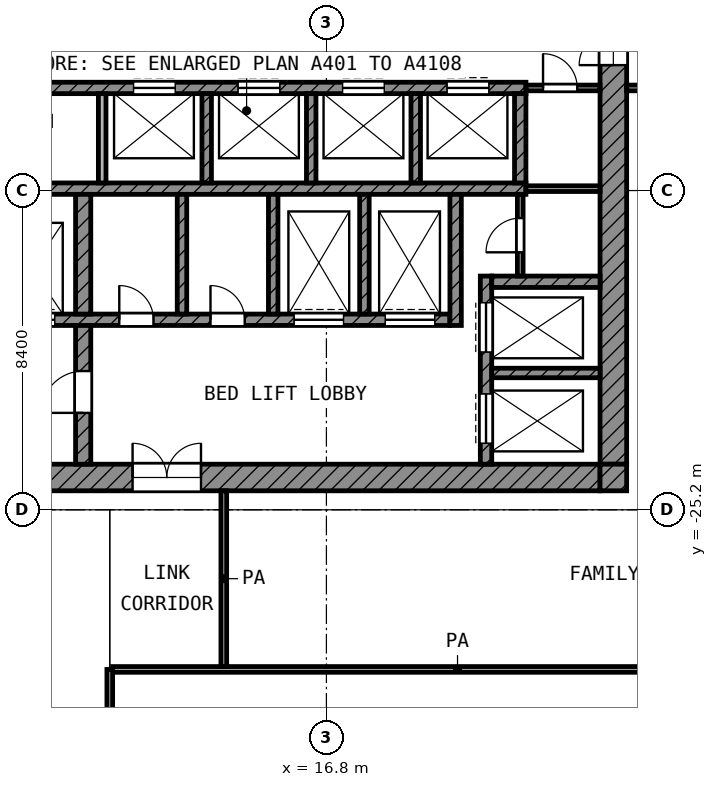
"""IFC4 building model, lengths in metres.
Left out: names, types, materials, properties, quantities, classifications, styles, units other than length and angle.
Written with IfcOpenShell. Run it as: python <this file> out.ifc"""

import sys

from ifc_helpers import new_model, si_unit, direction, frame, frame_2d, origin, place, context, subcontext, project, spatial, rectangle, extrude, element, fill, save


model = new_model("IFC4")
c1 = context("Model", 3, precision=1e-05, world=origin(), true_north=direction((0.0, 1.0)))
c2 = subcontext(c1, "Body", "Model", "MODEL_VIEW")
j1 = project(units=[si_unit("LENGTHUNIT", "METRE"), si_unit("PLANEANGLEUNIT", "RADIAN")], contexts=[c1])
p1 = place(None, origin())
s1 = spatial("IfcSite", under=j1, at=p1, CompositionType="ELEMENT")
p2 = place(p1, origin())
s2 = spatial("IfcBuilding", under=s1, at=p2, CompositionType="ELEMENT")
p3 = place(p2, frame((0.0, 0.0, 323.8)))
s3 = spatial("IfcBuildingStorey", under=s2, at=p3, CompositionType="ELEMENT", Elevation=323.8)
p4 = place(p3, frame((24.35, -24.0, 0.0), z_axis=(0.0, 0.0, 1.0), x_axis=(0.0, 1.0, 0.0)))
e1 = element("IfcWall", 1, at=p4, inside=s3, PredefinedType="SHEAR", context=c2, shape_type="SweptSolid", body=[
    extrude(rectangle(XDim=18.6, YDim=0.7, at=frame_2d((9.3, 0.0))), origin(), (0.0, 0.0, 1.0), 3.6),
])
p5 = place(p4, frame((10.5, 0.0, 0.0)))
e2 = element("IfcOpeningElement", 2, at=p5, cuts=e1, PredefinedType="OPENING", context=c2, shape_type="SweptSolid", body=[
    extrude(rectangle(XDim=1.8, YDim=2.1, at=frame_2d((0.9, 1.05))), frame((0.0, 0.36, 0.0), z_axis=(0.0, -1.0, 0.0), x_axis=(1.0, 0.0, 0.0)), (0.0, 0.0, 1.0), 0.72),
])
p6 = place(p3, frame((5.4, -24.35, 0.0), z_axis=(0.0, 0.0, 1.0), x_axis=(1.0, 0.0, 0.0)))
e3 = element("IfcWall", 3, at=p6, inside=s3, PredefinedType="SHEAR", context=c2, shape_type="SweptSolid", body=[
    extrude(rectangle(XDim=18.6, YDim=0.7, at=frame_2d((9.3, 0.0))), origin(), (0.0, 0.0, 1.0), 3.6),
])
p7 = place(p6, frame((6.3, 0.0, 0.0)))
e4 = element("IfcOpeningElement", 4, at=p7, cuts=e3, PredefinedType="OPENING", context=c2, shape_type="SweptSolid", body=[
    extrude(rectangle(XDim=1.8, YDim=2.1, at=frame_2d((0.9, 1.05))), frame((0.0, 0.36, 0.0), z_axis=(0.0, -1.0, 0.0), x_axis=(1.0, 0.0, 0.0)), (0.0, 0.0, 1.0), 0.72),
])
p8 = place(p3, frame((24.35, -24.7, 0.0), z_axis=(0.0, 0.0, 1.0), x_axis=(0.0, 1.0, 0.0)))
e5 = element("IfcWall", 5, at=p8, inside=s3, PredefinedType="SHEAR", context=c2, shape_type="SweptSolid", body=[
    extrude(rectangle(XDim=0.7, YDim=0.7, at=frame_2d((0.35, 0.0))), origin(), (0.0, 0.0, 1.0), 3.6),
])
p9 = place(p3, frame((5.4, -14.1, 0.0), z_axis=(0.0, 0.0, 1.0), x_axis=(1.0, 0.0, 0.0)))
e6 = element("IfcWall", 6, at=p9, inside=s3, PredefinedType="SHEAR", context=c2, shape_type="SweptSolid", body=[
    extrude(rectangle(XDim=16.65, YDim=0.3, at=frame_2d((8.325, 0.0))), origin(), (0.0, 0.0, 1.0), 3.6),
])
p10 = place(p9, frame((6.325, 0.0, 0.0)))
e7 = element("IfcOpeningElement", 7, at=p10, cuts=e6, PredefinedType="OPENING", context=c2, shape_type="SweptSolid", body=[
    extrude(rectangle(XDim=1.1, YDim=2.1, at=frame_2d((0.55, 1.05))), frame((0.0, 0.16, 0.0), z_axis=(0.0, -1.0, 0.0), x_axis=(1.0, 0.0, 0.0)), (0.0, 0.0, 1.0), 0.32),
])
p11 = place(p9, frame((9.075, 0.0, 0.0)))
e8 = element("IfcOpeningElement", 8, at=p11, cuts=e6, PredefinedType="OPENING", context=c2, shape_type="SweptSolid", body=[
    extrude(rectangle(XDim=1.1, YDim=2.1, at=frame_2d((0.55, 1.05))), frame((0.0, 0.16, 0.0), z_axis=(0.0, -1.0, 0.0), x_axis=(1.0, 0.0, 0.0)), (0.0, 0.0, 1.0), 0.32),
])
p12 = place(p9, frame((11.825, 0.0, 0.0)))
e9 = element("IfcOpeningElement", 9, at=p12, cuts=e6, PredefinedType="OPENING", context=c2, shape_type="SweptSolid", body=[
    extrude(rectangle(XDim=1.1, YDim=2.1, at=frame_2d((0.55, 1.05))), frame((0.0, 0.16, 0.0), z_axis=(0.0, -1.0, 0.0), x_axis=(1.0, 0.0, 0.0)), (0.0, 0.0, 1.0), 0.32),
])
p13 = place(p9, frame((14.575, 0.0, 0.0)))
e10 = element("IfcOpeningElement", 10, at=p13, cuts=e6, PredefinedType="OPENING", context=c2, shape_type="SweptSolid", body=[
    extrude(rectangle(XDim=1.1, YDim=2.1, at=frame_2d((0.55, 1.05))), frame((0.0, 0.16, 0.0), z_axis=(0.0, -1.0, 0.0), x_axis=(1.0, 0.0, 0.0)), (0.0, 0.0, 1.0), 0.32),
])
p14 = place(p9, frame((2.3, 0.0, 0.0)))
e11 = element("IfcOpeningElement", 11, at=p14, cuts=e6, PredefinedType="OPENING", context=c2, shape_type="SweptSolid", body=[
    extrude(rectangle(XDim=0.9, YDim=2.1, at=frame_2d((0.45, 1.05))), frame((0.0, 0.16, 0.0), z_axis=(0.0, -1.0, 0.0), x_axis=(1.0, 0.0, 0.0)), (0.0, 0.0, 1.0), 0.32),
])
p15 = place(p3, frame((5.4, -16.75, 0.0), z_axis=(0.0, 0.0, 1.0), x_axis=(1.0, 0.0, 0.0)))
e12 = element("IfcWall", 12, at=p15, inside=s3, PredefinedType="SHEAR", context=c2, shape_type="SweptSolid", body=[
    extrude(rectangle(XDim=16.65, YDim=0.3, at=frame_2d((8.325, 0.0))), origin(), (0.0, 0.0, 1.0), 3.6),
])
p16 = place(p3, frame((5.4, -20.2, 0.0), z_axis=(0.0, 0.0, 1.0), x_axis=(1.0, 0.0, 0.0)))
e13 = element("IfcWall", 13, at=p16, inside=s3, PredefinedType="SHEAR", context=c2, shape_type="SweptSolid", body=[
    extrude(rectangle(XDim=14.65, YDim=0.3, at=frame_2d((7.325, 0.0))), origin(), (0.0, 0.0, 1.0), 3.6),
])
p17 = place(p16, frame((10.55, 0.0, 0.0)))
e14 = element("IfcOpeningElement", 14, at=p17, cuts=e13, PredefinedType="OPENING", context=c2, shape_type="SweptSolid", body=[
    extrude(rectangle(XDim=1.3, YDim=2.1, at=frame_2d((0.65, 1.05))), frame((0.0, 0.16, 0.0), z_axis=(0.0, -1.0, 0.0), x_axis=(1.0, 0.0, 0.0)), (0.0, 0.0, 1.0), 0.32),
])
p18 = place(p16, frame((12.95, 0.0, 0.0)))
e15 = element("IfcOpeningElement", 15, at=p18, cuts=e13, PredefinedType="OPENING", context=c2, shape_type="SweptSolid", body=[
    extrude(rectangle(XDim=1.3, YDim=2.1, at=frame_2d((0.65, 1.05))), frame((0.0, 0.16, 0.0), z_axis=(0.0, -1.0, 0.0), x_axis=(1.0, 0.0, 0.0)), (0.0, 0.0, 1.0), 0.32),
])
p19 = place(p16, frame((0.55, 0.0, 0.0)))
e16 = element("IfcOpeningElement", 16, at=p19, cuts=e13, PredefinedType="OPENING", context=c2, shape_type="SweptSolid", body=[
    extrude(rectangle(XDim=1.3, YDim=2.1, at=frame_2d((0.65, 1.05))), frame((0.0, 0.16, 0.0), z_axis=(0.0, -1.0, 0.0), x_axis=(1.0, 0.0, 0.0)), (0.0, 0.0, 1.0), 0.32),
])
p20 = place(p16, frame((2.95, 0.0, 0.0)))
e17 = element("IfcOpeningElement", 17, at=p20, cuts=e13, PredefinedType="OPENING", context=c2, shape_type="SweptSolid", body=[
    extrude(rectangle(XDim=1.3, YDim=2.1, at=frame_2d((0.65, 1.05))), frame((0.0, 0.16, 0.0), z_axis=(0.0, -1.0, 0.0), x_axis=(1.0, 0.0, 0.0)), (0.0, 0.0, 1.0), 0.32),
])
p21 = place(p16, frame((5.95, 0.0, 0.0)))
e18 = element("IfcOpeningElement", 18, at=p21, cuts=e13, PredefinedType="OPENING", context=c2, shape_type="SweptSolid", body=[
    extrude(rectangle(XDim=0.9, YDim=2.1, at=frame_2d((0.45, 1.05))), frame((0.0, 0.16, 0.0), z_axis=(0.0, -1.0, 0.0), x_axis=(1.0, 0.0, 0.0)), (0.0, 0.0, 1.0), 0.32),
])
p22 = place(p16, frame((8.35, 0.0, 0.0)))
e19 = element("IfcOpeningElement", 19, at=p22, cuts=e13, PredefinedType="OPENING", context=c2, shape_type="SweptSolid", body=[
    extrude(rectangle(XDim=0.9, YDim=2.1, at=frame_2d((0.45, 1.05))), frame((0.0, 0.16, 0.0), z_axis=(0.0, -1.0, 0.0), x_axis=(1.0, 0.0, 0.0)), (0.0, 0.0, 1.0), 0.32),
])
p23 = place(p3, frame((10.4, -24.0, 0.0), z_axis=(0.0, 0.0, 1.0), x_axis=(0.0, 1.0, 0.0)))
e20 = element("IfcWall", 20, at=p23, inside=s3, PredefinedType="SHEAR", context=c2, shape_type="SweptSolid", body=[
    extrude(rectangle(XDim=3.65, YDim=0.4, at=frame_2d((1.825, 0.0))), origin(), (0.0, 0.0, 1.0), 3.6),
])
p24 = place(p23, frame((1.35, 0.0, 0.0)))
e21 = element("IfcOpeningElement", 21, at=p24, cuts=e20, PredefinedType="OPENING", context=c2, shape_type="SweptSolid", body=[
    extrude(rectangle(XDim=1.1, YDim=2.1, at=frame_2d((0.55, 1.05))), frame((0.0, 0.21, 0.0), z_axis=(0.0, -1.0, 0.0), x_axis=(1.0, 0.0, 0.0)), (0.0, 0.0, 1.0), 0.42),
])
p25 = place(p3, frame((10.4, -20.05, 0.0), z_axis=(0.0, 0.0, 1.0), x_axis=(0.0, 1.0, 0.0)))
e22 = element("IfcWall", 22, at=p25, inside=s3, PredefinedType="SHEAR", context=c2, shape_type="SweptSolid", body=[
    extrude(rectangle(XDim=3.15, YDim=0.4, at=frame_2d((1.575, 0.0))), origin(), (0.0, 0.0, 1.0), 3.6),
])
p26 = place(p3, frame((20.2, -20.35, 0.0), z_axis=(0.0, 0.0, 1.0), x_axis=(0.0, 1.0, 0.0)))
e23 = element("IfcWall", 23, at=p26, inside=s3, PredefinedType="SHEAR", context=c2, shape_type="SweptSolid", body=[
    extrude(rectangle(XDim=3.45, YDim=0.3, at=frame_2d((1.725, 0.0))), origin(), (0.0, 0.0, 1.0), 3.6),
])
p27 = place(p3, frame((21.9, -16.6, 0.0), z_axis=(0.0, 0.0, 1.0), x_axis=(0.0, 1.0, 0.0)))
e24 = element("IfcWall", 24, at=p27, inside=s3, PredefinedType="SHEAR", context=c2, shape_type="SweptSolid", body=[
    extrude(rectangle(XDim=2.35, YDim=0.3, at=frame_2d((1.175, 0.0))), origin(), (0.0, 0.0, 1.0), 3.6),
])
p28 = place(p3, frame((21.15, -19.2, 0.0), z_axis=(0.0, 0.0, 1.0), x_axis=(1.0, 0.0, 0.0)))
e25 = element("IfcWall", 25, at=p28, inside=s3, PredefinedType="SHEAR", context=c2, shape_type="SweptSolid", body=[
    extrude(rectangle(XDim=2.85, YDim=0.3, at=frame_2d((1.425, 0.0))), origin(), (0.0, 0.0, 1.0), 3.6),
])
p29 = place(p3, frame((21.0, -24.0, 0.0), z_axis=(0.0, 0.0, 1.0), x_axis=(0.0, 1.0, 0.0)))
e26 = element("IfcWall", 26, at=p29, inside=s3, PredefinedType="SHEAR", context=c2, shape_type="SweptSolid", body=[
    extrude(rectangle(XDim=4.95, YDim=0.3, at=frame_2d((2.475, 0.0))), origin(), (0.0, 0.0, 1.0), 3.6),
])
p30 = place(p29, frame((2.95, 0.0, 0.0)))
e27 = element("IfcOpeningElement", 27, at=p30, cuts=e26, PredefinedType="OPENING", context=c2, shape_type="SweptSolid", body=[
    extrude(rectangle(XDim=1.3, YDim=2.1, at=frame_2d((0.65, 1.05))), frame((0.0, 0.16, 0.0), z_axis=(0.0, -1.0, 0.0), x_axis=(1.0, 0.0, 0.0)), (0.0, 0.0, 1.0), 0.32),
])
p31 = place(p29, frame((0.55, 0.0, 0.0)))
e28 = element("IfcOpeningElement", 28, at=p31, cuts=e26, PredefinedType="OPENING", context=c2, shape_type="SweptSolid", body=[
    extrude(rectangle(XDim=1.3, YDim=2.1, at=frame_2d((0.65, 1.05))), frame((0.0, 0.16, 0.0), z_axis=(0.0, -1.0, 0.0), x_axis=(1.0, 0.0, 0.0)), (0.0, 0.0, 1.0), 0.32),
])
p32 = place(p3, frame((21.15, -21.6, 0.0), z_axis=(0.0, 0.0, 1.0), x_axis=(1.0, 0.0, 0.0)))
e29 = element("IfcWall", 29, at=p32, inside=s3, PredefinedType="SHEAR", context=c2, shape_type="SweptSolid", body=[
    extrude(rectangle(XDim=2.85, YDim=0.25, at=frame_2d((1.425, 0.0))), origin(), (0.0, 0.0, 1.0), 3.6),
])
for number, where, z_axis, x_axis in (
    (30, (13.0, -20.05, 0.0), (0.0, 0.0, 1.0), (0.0, 1.0, 0.0)),
    (31, (15.4, -20.05, 0.0), (0.0, 0.0, 1.0), (0.0, 1.0, 0.0)),
    (32, (17.8, -20.05, 0.0), (0.0, 0.0, 1.0), (0.0, 1.0, 0.0)),
):
    element("IfcWall", number, at=place(p3, frame(where, z_axis=z_axis, x_axis=x_axis)), inside=s3, PredefinedType="SHEAR", context=c2, shape_type="SweptSolid", body=[
        extrude(rectangle(XDim=3.15, YDim=0.25, at=frame_2d((1.575, 0.0))), origin(), (0.0, 0.0, 1.0), 3.6),
    ])
p33 = place(p3, frame((10.9, -16.6, 0.0), z_axis=(0.0, 0.0, 1.0), x_axis=(0.0, 1.0, 0.0)))
e33 = element("IfcWall", 33, at=p33, inside=s3, PredefinedType="PARTITIONING", context=c2, shape_type="SweptSolid", body=[
    extrude(rectangle(XDim=2.35, YDim=0.2, at=frame_2d((1.175, 0.0))), origin(), (0.0, 0.0, 1.0), 3.6),
])
for number, where, z_axis, x_axis in (
    (34, (13.65, -16.6, 0.0), (0.0, 0.0, 1.0), (0.0, 1.0, 0.0)),
    (35, (16.4, -16.6, 0.0), (0.0, 0.0, 1.0), (0.0, 1.0, 0.0)),
    (36, (19.15, -16.6, 0.0), (0.0, 0.0, 1.0), (0.0, 1.0, 0.0)),
):
    element("IfcWall", number, at=place(p3, frame(where, z_axis=z_axis, x_axis=x_axis)), inside=s3, PredefinedType="SHEAR", context=c2, shape_type="SweptSolid", body=[
        extrude(rectangle(XDim=2.35, YDim=0.25, at=frame_2d((1.175, 0.0))), origin(), (0.0, 0.0, 1.0), 3.6),
    ])
p34 = place(p3, frame((21.9, -19.05, 0.0), z_axis=(0.0, 0.0, 1.0), x_axis=(0.0, 1.0, 0.0)))
e37 = element("IfcWall", 37, at=p34, inside=s3, PredefinedType="PARTITIONING", context=c2, shape_type="SweptSolid", body=[
    extrude(rectangle(XDim=2.15, YDim=0.15, at=frame_2d((1.075, 0.0))), origin(), (0.0, 0.0, 1.0), 3.6),
])
p35 = place(p34, frame((0.625, 0.0, 0.0)))
e38 = element("IfcOpeningElement", 38, at=p35, cuts=e37, PredefinedType="OPENING", context=c2, shape_type="SweptSolid", body=[
    extrude(rectangle(XDim=0.9, YDim=2.1, at=frame_2d((0.45, 1.05))), frame((0.0, 0.085, 0.0), z_axis=(0.0, -1.0, 0.0), x_axis=(1.0, 0.0, 0.0)), (0.0, 0.0, 1.0), 0.17),
])
p36 = place(p3, frame((22.05, -16.75, 0.0), z_axis=(0.0, 0.0, 1.0), x_axis=(1.0, 0.0, 0.0)))
e39 = element("IfcWall", 39, at=p36, inside=s3, PredefinedType="PARTITIONING", context=c2, shape_type="SweptSolid", body=[
    extrude(rectangle(XDim=1.95, YDim=0.15, at=frame_2d((0.975, 0.0))), origin(), (0.0, 0.0, 1.0), 3.6),
])
p37 = place(p3, frame((22.05, -14.1, 0.0), z_axis=(0.0, 0.0, 1.0), x_axis=(1.0, 0.0, 0.0)))
e40 = element("IfcWall", 40, at=p37, inside=s3, PredefinedType="PARTITIONING", context=c2, shape_type="SweptSolid", body=[
    extrude(rectangle(XDim=1.95, YDim=0.15, at=frame_2d((0.975, 0.0))), origin(), (0.0, 0.0, 1.0), 3.6),
])
p38 = place(p37, frame((0.45, 0.0, 0.0)))
e41 = element("IfcOpeningElement", 41, at=p38, cuts=e40, PredefinedType="OPENING", context=c2, shape_type="SweptSolid", body=[
    extrude(rectangle(XDim=0.9, YDim=2.1, at=frame_2d((0.45, 1.05))), frame((0.0, 0.085, 0.0), z_axis=(0.0, -1.0, 0.0), x_axis=(1.0, 0.0, 0.0)), (0.0, 0.0, 1.0), 0.17),
])
p39 = place(p3, frame((11.175, -29.4, 0.0), z_axis=(0.0, 0.0, 1.0), x_axis=(1.0, 0.0, 0.0)))
e42 = element("IfcWall", 42, at=p39, inside=s3, PredefinedType="PARTITIONING", context=c2, shape_type="SweptSolid", body=[
    extrude(rectangle(XDim=18.15, YDim=0.15, at=frame_2d((9.075, 0.0))), origin(), (0.0, 0.0, 1.0), 3.6),
])
p40 = place(p3, frame((24.7, -14.1, 0.0), z_axis=(0.0, 0.0, 1.0), x_axis=(1.0, 0.0, 0.0)))
e43 = element("IfcWall", 43, at=p40, inside=s3, PredefinedType="PARTITIONING", context=c2, shape_type="SweptSolid", body=[
    extrude(rectangle(XDim=4.625, YDim=0.15, at=frame_2d((2.312, 0.0))), origin(), (0.0, 0.0, 1.0), 3.6),
])
p41 = place(p40, frame((1.85, 0.0, 0.0)))
e44 = element("IfcOpeningElement", 44, at=p41, cuts=e43, PredefinedType="OPENING", context=c2, shape_type="SweptSolid", body=[
    extrude(rectangle(XDim=1.5, YDim=2.1, at=frame_2d((0.75, 1.05))), frame((0.0, 0.085, 0.0), z_axis=(0.0, -1.0, 0.0), x_axis=(1.0, 0.0, 0.0)), (0.0, 0.0, 1.0), 0.17),
])
p42 = place(p3, frame((11.1, -41.92, 0.0), z_axis=(0.0, 0.0, 1.0), x_axis=(0.0, 1.0, 0.0)))
e45 = element("IfcWall", 45, at=p42, inside=s3, PredefinedType="PARTITIONING", context=c2, shape_type="SweptSolid", body=[
    extrude(rectangle(XDim=12.52, YDim=0.15, at=frame_2d((6.26, 0.0))), origin(), (0.0, 0.0, 1.0), 3.6),
])
p43 = place(p42, frame((7.57, 0.0, 0.0)))
e46 = element("IfcOpeningElement", 46, at=p43, cuts=e45, PredefinedType="OPENING", context=c2, shape_type="SweptSolid", body=[
    extrude(rectangle(XDim=1.2, YDim=2.1, at=frame_2d((0.6, 1.05))), frame((0.0, 0.085, 0.0), z_axis=(0.0, -1.0, 0.0), x_axis=(1.0, 0.0, 0.0)), (0.0, 0.0, 1.0), 0.17),
])
p44 = place(p42, frame((1.37, 0.0, 0.0)))
e47 = element("IfcOpeningElement", 47, at=p44, cuts=e45, PredefinedType="OPENING", context=c2, shape_type="SweptSolid", body=[
    extrude(rectangle(XDim=1.0, YDim=2.1, at=frame_2d((0.5, 1.05))), frame((0.0, 0.085, 0.0), z_axis=(0.0, -1.0, 0.0), x_axis=(1.0, 0.0, 0.0)), (0.0, 0.0, 1.0), 0.17),
])
p45 = place(p3, frame((14.1, -29.325, 0.0), z_axis=(0.0, 0.0, 1.0), x_axis=(0.0, 1.0, 0.0)))
e48 = element("IfcWall", 48, at=p45, inside=s3, PredefinedType="PARTITIONING", context=c2, shape_type="SweptSolid", body=[
    extrude(rectangle(XDim=4.625, YDim=0.15, at=frame_2d((2.312, 0.0))), origin(), (0.0, 0.0, 1.0), 3.6),
])
p46 = place(p10, origin())
e49 = element("IfcDoor", 49, at=p46, inside=s3, OperationType="DOUBLE_DOOR_SLIDING", PredefinedType="DOOR", context=c2, shape_type="SweptSolid", body=[
    extrude(rectangle(XDim=1.1, YDim=2.1, at=frame_2d((0.55, 1.05))), frame((0.0, 0.025, 0.0), z_axis=(0.0, -1.0, 0.0), x_axis=(1.0, 0.0, 0.0)), (0.0, 0.0, 1.0), 0.05),
])
fill(e7, e49)
p47 = place(p11, origin())
e50 = element("IfcDoor", 50, at=p47, inside=s3, OperationType="DOUBLE_DOOR_SLIDING", PredefinedType="DOOR", context=c2, shape_type="SweptSolid", body=[
    extrude(rectangle(XDim=1.1, YDim=2.1, at=frame_2d((0.55, 1.05))), frame((0.0, 0.025, 0.0), z_axis=(0.0, -1.0, 0.0), x_axis=(1.0, 0.0, 0.0)), (0.0, 0.0, 1.0), 0.05),
])
fill(e8, e50)
p48 = place(p12, origin())
e51 = element("IfcDoor", 51, at=p48, inside=s3, OperationType="DOUBLE_DOOR_SLIDING", PredefinedType="DOOR", context=c2, shape_type="SweptSolid", body=[
    extrude(rectangle(XDim=1.1, YDim=2.1, at=frame_2d((0.55, 1.05))), frame((0.0, 0.025, 0.0), z_axis=(0.0, -1.0, 0.0), x_axis=(1.0, 0.0, 0.0)), (0.0, 0.0, 1.0), 0.05),
])
fill(e9, e51)
p49 = place(p13, origin())
e52 = element("IfcDoor", 52, at=p49, inside=s3, OperationType="DOUBLE_DOOR_SLIDING", PredefinedType="DOOR", context=c2, shape_type="SweptSolid", body=[
    extrude(rectangle(XDim=1.1, YDim=2.1, at=frame_2d((0.55, 1.05))), frame((0.0, 0.025, 0.0), z_axis=(0.0, -1.0, 0.0), x_axis=(1.0, 0.0, 0.0)), (0.0, 0.0, 1.0), 0.05),
])
fill(e10, e52)
p50 = place(p30, origin())
e53 = element("IfcDoor", 53, at=p50, inside=s3, OperationType="DOUBLE_DOOR_SLIDING", PredefinedType="DOOR", context=c2, shape_type="SweptSolid", body=[
    extrude(rectangle(XDim=1.3, YDim=2.1, at=frame_2d((0.65, 1.05))), frame((0.0, 0.025, 0.0), z_axis=(0.0, -1.0, 0.0), x_axis=(1.0, 0.0, 0.0)), (0.0, 0.0, 1.0), 0.05),
])
fill(e27, e53)
p51 = place(p31, origin())
e54 = element("IfcDoor", 54, at=p51, inside=s3, OperationType="DOUBLE_DOOR_SLIDING", PredefinedType="DOOR", context=c2, shape_type="SweptSolid", body=[
    extrude(rectangle(XDim=1.3, YDim=2.1, at=frame_2d((0.65, 1.05))), frame((0.0, 0.025, 0.0), z_axis=(0.0, -1.0, 0.0), x_axis=(1.0, 0.0, 0.0)), (0.0, 0.0, 1.0), 0.05),
])
fill(e28, e54)
p52 = place(p17, origin())
e55 = element("IfcDoor", 55, at=p52, inside=s3, OperationType="DOUBLE_DOOR_SLIDING", PredefinedType="DOOR", context=c2, shape_type="SweptSolid", body=[
    extrude(rectangle(XDim=1.3, YDim=2.1, at=frame_2d((0.65, 1.05))), frame((0.0, 0.025, 0.0), z_axis=(0.0, -1.0, 0.0), x_axis=(1.0, 0.0, 0.0)), (0.0, 0.0, 1.0), 0.05),
])
fill(e14, e55)
p53 = place(p18, origin())
e56 = element("IfcDoor", 56, at=p53, inside=s3, OperationType="DOUBLE_DOOR_SLIDING", PredefinedType="DOOR", context=c2, shape_type="SweptSolid", body=[
    extrude(rectangle(XDim=1.3, YDim=2.1, at=frame_2d((0.65, 1.05))), frame((0.0, 0.025, 0.0), z_axis=(0.0, -1.0, 0.0), x_axis=(1.0, 0.0, 0.0)), (0.0, 0.0, 1.0), 0.05),
])
fill(e15, e56)
p54 = place(p20, origin())
e57 = element("IfcDoor", 57, at=p54, inside=s3, OperationType="DOUBLE_DOOR_SLIDING", PredefinedType="DOOR", context=c2, shape_type="SweptSolid", body=[
    extrude(rectangle(XDim=1.3, YDim=2.1, at=frame_2d((0.65, 1.05))), frame((0.0, 0.025, 0.0), z_axis=(0.0, -1.0, 0.0), x_axis=(1.0, 0.0, 0.0)), (0.0, 0.0, 1.0), 0.05),
])
fill(e17, e57)
p55 = place(p24, origin())
e58 = element("IfcDoor", 58, at=p55, inside=s3, OperationType="SINGLE_SWING_LEFT", PredefinedType="DOOR", context=c2, shape_type="SweptSolid", body=[
    extrude(rectangle(XDim=1.1, YDim=2.1, at=frame_2d((0.55, 1.05))), frame((0.0, 0.025, 0.0), z_axis=(0.0, -1.0, 0.0), x_axis=(1.0, 0.0, 0.0)), (0.0, 0.0, 1.0), 0.05),
])
fill(e21, e58)
p56 = place(p5, origin())
e59 = element("IfcDoor", 59, at=p56, inside=s3, OperationType="DOUBLE_DOOR_SINGLE_SWING", PredefinedType="DOOR", context=c2, shape_type="SweptSolid", body=[
    extrude(rectangle(XDim=1.8, YDim=2.1, at=frame_2d((0.9, 1.05))), frame((0.0, 0.025, 0.0), z_axis=(0.0, -1.0, 0.0), x_axis=(1.0, 0.0, 0.0)), (0.0, 0.0, 1.0), 0.05),
])
fill(e2, e59)
p57 = place(p7, origin())
e60 = element("IfcDoor", 60, at=p57, inside=s3, OperationType="DOUBLE_DOOR_SINGLE_SWING", PredefinedType="DOOR", context=c2, shape_type="SweptSolid", body=[
    extrude(rectangle(XDim=1.8, YDim=2.1, at=frame_2d((0.9, 1.05))), frame((0.0, 0.025, 0.0), z_axis=(0.0, -1.0, 0.0), x_axis=(1.0, 0.0, 0.0)), (0.0, 0.0, 1.0), 0.05),
])
fill(e4, e60)
p58 = place(p38, origin())
e61 = element("IfcDoor", 61, at=p58, inside=s3, OperationType="SINGLE_SWING_LEFT", PredefinedType="DOOR", context=c2, shape_type="SweptSolid", body=[
    extrude(rectangle(XDim=0.9, YDim=2.1, at=frame_2d((0.45, 1.05))), frame((0.0, 0.025, 0.0), z_axis=(0.0, -1.0, 0.0), x_axis=(1.0, 0.0, 0.0)), (0.0, 0.0, 1.0), 0.05),
])
fill(e41, e61)
p59 = place(p35, origin())
e62 = element("IfcDoor", 62, at=p59, inside=s3, OperationType="SINGLE_SWING_LEFT", PredefinedType="DOOR", context=c2, shape_type="SweptSolid", body=[
    extrude(rectangle(XDim=0.9, YDim=2.1, at=frame_2d((0.45, 1.05))), frame((0.0, 0.025, 0.0), z_axis=(0.0, -1.0, 0.0), x_axis=(1.0, 0.0, 0.0)), (0.0, 0.0, 1.0), 0.05),
])
fill(e38, e62)
p60 = place(p21, origin())
e63 = element("IfcDoor", 63, at=p60, inside=s3, OperationType="SINGLE_SWING_LEFT", PredefinedType="DOOR", context=c2, shape_type="SweptSolid", body=[
    extrude(rectangle(XDim=0.9, YDim=2.1, at=frame_2d((0.45, 1.05))), frame((0.0, 0.025, 0.0), z_axis=(0.0, -1.0, 0.0), x_axis=(1.0, 0.0, 0.0)), (0.0, 0.0, 1.0), 0.05),
])
fill(e18, e63)
p61 = place(p22, origin())
e64 = element("IfcDoor", 64, at=p61, inside=s3, OperationType="SINGLE_SWING_LEFT", PredefinedType="DOOR", context=c2, shape_type="SweptSolid", body=[
    extrude(rectangle(XDim=0.9, YDim=2.1, at=frame_2d((0.45, 1.05))), frame((0.0, 0.025, 0.0), z_axis=(0.0, -1.0, 0.0), x_axis=(1.0, 0.0, 0.0)), (0.0, 0.0, 1.0), 0.05),
])
fill(e19, e64)
save(model, sys.argv[1])
